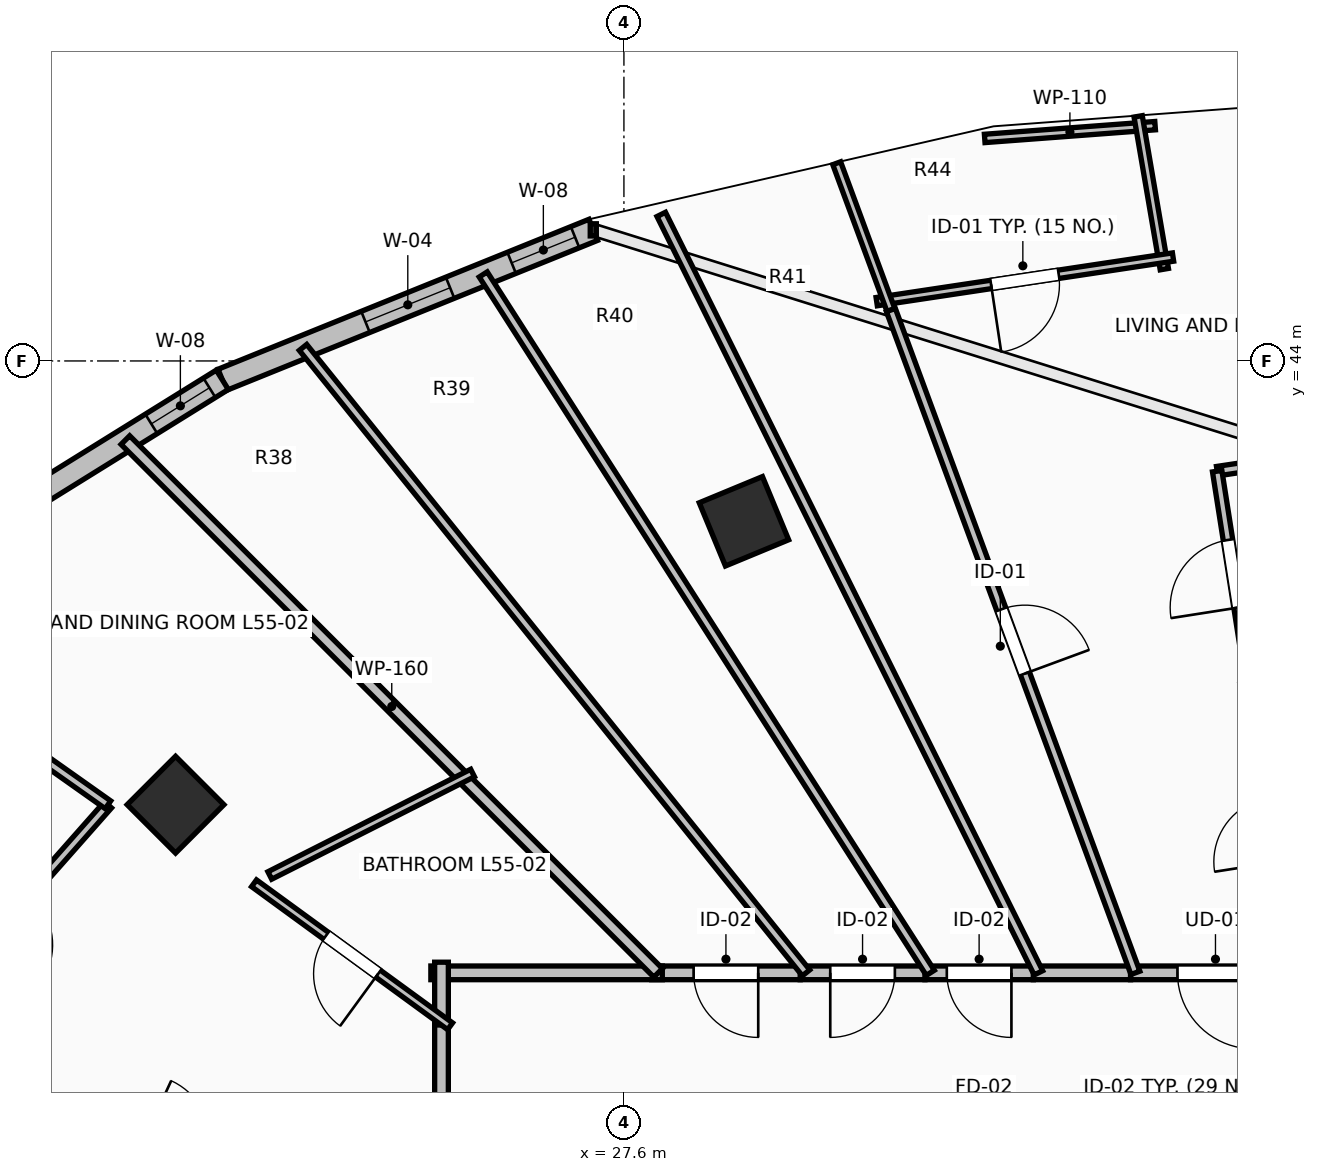
"""IFC4 building model, lengths in metres.
Left out: names, types, materials, properties, quantities, classifications, styles, units other than length and angle.
Written with IfcOpenShell. Run it as: python <this file> out.ifc"""

import sys

from ifc_helpers import new_model, si_unit, direction, frame, frame_2d, origin, origin_2d, place, context, subcontext, project, spatial, rectangle, extrude, element, fill, save


model = new_model("IFC4")
c1 = context("Model", 3, precision=1e-05, world=origin(), true_north=direction((0.0, 1.0)))
c2 = subcontext(c1, "Body", "Model", "MODEL_VIEW")
j1 = project(units=[si_unit("LENGTHUNIT", "METRE"), si_unit("PLANEANGLEUNIT", "RADIAN")], contexts=[c1])
p1 = place(None, origin())
s1 = spatial("IfcSite", under=j1, at=p1, CompositionType="ELEMENT")
p2 = place(p1, origin())
s2 = spatial("IfcBuilding", under=s1, at=p2, CompositionType="ELEMENT")
p3 = place(p2, frame((0.0, 0.0, 203.65)))
s3 = spatial("IfcBuildingStorey", under=s2, at=p3, CompositionType="ELEMENT", Elevation=203.65)
for number, where, z_axis, x_axis in (
    (1, (29.179, 41.891, 0.0), (0.0, 0.0, 1.0), (-0.383, 0.924, 0.0)),
    (2, (21.701, 38.162, 0.0), (0.0, 0.0, 1.0), (-0.707, 0.707, 0.0)),
):
    element("IfcColumn", number, at=place(p3, frame(where, z_axis=z_axis, x_axis=x_axis)), inside=s3, PredefinedType="COLUMN", context=c2, shape_type="SweptSolid", body=[
        extrude(rectangle(XDim=0.9, YDim=0.9, at=origin_2d()), origin(), (0.0, 0.0, 1.0), 3.55),
    ])
p4 = place(p3, frame((27.197, 45.725, 0.0), z_axis=(0.0, 0.0, 1.0), x_axis=(-0.927111094334, -0.374786630981, 0.0)))
e3 = element("IfcWall", 3, at=p4, inside=s3, PredefinedType="STANDARD", context=c2, shape_type="SweptSolid", body=[
    extrude(rectangle(XDim=5.264, YDim=0.3, at=frame_2d((2.632, 0.0))), origin(), (0.0, 0.0, 1.0), 3.29),
])
p5 = place(p4, frame((0.258, 0.0, 0.85)))
e4 = element("IfcOpeningElement", 4, at=p5, cuts=e3, PredefinedType="OPENING", context=c2, shape_type="SweptSolid", body=[
    extrude(rectangle(XDim=0.9, YDim=1.8, at=frame_2d((0.45, 0.9))), frame((0.0, 0.165, 0.0), z_axis=(0.0, -1.0, 0.0), x_axis=(1.0, 0.0, 0.0)), (0.0, 0.0, 1.0), 0.33),
])
p6 = place(p4, frame((2.032, 0.0, 0.85)))
e5 = element("IfcOpeningElement", 5, at=p6, cuts=e3, PredefinedType="OPENING", context=c2, shape_type="SweptSolid", body=[
    extrude(rectangle(XDim=1.2, YDim=1.95, at=frame_2d((0.6, 0.975))), frame((0.0, 0.165, 0.0), z_axis=(0.0, -1.0, 0.0), x_axis=(1.0, 0.0, 0.0)), (0.0, 0.0, 1.0), 0.33),
])
p7 = place(p3, frame((22.316, 43.752, 0.0), z_axis=(0.0, 0.0, 1.0), x_axis=(-0.849647657754, -0.527350791858, 0.0)))
e6 = element("IfcWall", 6, at=p7, inside=s3, PredefinedType="STANDARD", context=c2, shape_type="SweptSolid", body=[
    extrude(rectangle(XDim=5.035, YDim=0.3, at=frame_2d((2.518, 0.0))), origin(), (0.0, 0.0, 1.0), 3.29),
])
p8 = place(p7, frame((0.199, 0.0, 0.85)))
e7 = element("IfcOpeningElement", 7, at=p8, cuts=e6, PredefinedType="OPENING", context=c2, shape_type="SweptSolid", body=[
    extrude(rectangle(XDim=0.9, YDim=1.8, at=frame_2d((0.45, 0.9))), frame((0.0, 0.165, 0.0), z_axis=(0.0, -1.0, 0.0), x_axis=(1.0, 0.0, 0.0)), (0.0, 0.0, 1.0), 0.33),
])
p9 = place(p3, frame((36.5, 35.95, 0.0), z_axis=(0.0, 0.0, 1.0), x_axis=(-1.0, 0.0, 0.0)))
e8 = element("IfcWall", 8, at=p9, inside=s3, PredefinedType="PARTITIONING", context=c2, shape_type="SweptSolid", body=[
    extrude(rectangle(XDim=2.235, YDim=0.18, at=frame_2d((1.118, 0.0))), origin(), (0.0, 0.0, 1.0), 3.29),
])
p10 = place(p9, frame((0.617, 0.0, 0.0)))
e9 = element("IfcOpeningElement", 9, at=p10, cuts=e8, PredefinedType="OPENING", context=c2, shape_type="SweptSolid", body=[
    extrude(rectangle(XDim=1.0, YDim=2.15, at=frame_2d((0.5, 1.075))), frame((0.0, 0.105, 0.0), z_axis=(0.0, -1.0, 0.0), x_axis=(1.0, 0.0, 0.0)), (0.0, 0.0, 1.0), 0.21),
])
p11 = place(p3, frame((34.265, 35.95, 0.0), z_axis=(0.0, 0.0, 1.0), x_axis=(-1.0, 0.0, 0.0)))
e10 = element("IfcWall", 10, at=p11, inside=s3, PredefinedType="PARTITIONING", context=c2, shape_type="SweptSolid", body=[
    extrude(rectangle(XDim=1.279, YDim=0.18, at=frame_2d((0.639, 0.0))), origin(), (0.0, 0.0, 1.0), 3.29),
])
p12 = place(p3, frame((32.986, 35.95, 0.0), z_axis=(0.0, 0.0, 1.0), x_axis=(-1.0, 0.0, 0.0)))
e11 = element("IfcWall", 11, at=p12, inside=s3, PredefinedType="PARTITIONING", context=c2, shape_type="SweptSolid", body=[
    extrude(rectangle(XDim=1.426, YDim=0.18, at=frame_2d((0.713, 0.0))), origin(), (0.0, 0.0, 1.0), 3.29),
])
p13 = place(p12, frame((0.288, 0.0, 0.0)))
e12 = element("IfcOpeningElement", 12, at=p13, cuts=e11, PredefinedType="OPENING", context=c2, shape_type="SweptSolid", body=[
    extrude(rectangle(XDim=0.85, YDim=2.1, at=frame_2d((0.425, 1.05))), frame((0.0, 0.105, 0.0), z_axis=(0.0, -1.0, 0.0), x_axis=(1.0, 0.0, 0.0)), (0.0, 0.0, 1.0), 0.21),
])
p14 = place(p3, frame((31.56, 35.95, 0.0), z_axis=(0.0, 0.0, 1.0), x_axis=(-1.0, 0.0, 0.0)))
e13 = element("IfcWall", 13, at=p14, inside=s3, PredefinedType="PARTITIONING", context=c2, shape_type="SweptSolid", body=[
    extrude(rectangle(XDim=1.641, YDim=0.18, at=frame_2d((0.821, 0.0))), origin(), (0.0, 0.0, 1.0), 2.482),
])
p15 = place(p14, frame((0.396, 0.0, 0.0)))
e14 = element("IfcOpeningElement", 14, at=p15, cuts=e13, PredefinedType="OPENING", context=c2, shape_type="SweptSolid", body=[
    extrude(rectangle(XDim=0.85, YDim=2.1, at=frame_2d((0.425, 1.05))), frame((0.0, 0.105, 0.0), z_axis=(0.0, -1.0, 0.0), x_axis=(1.0, 0.0, 0.0)), (0.0, 0.0, 1.0), 0.21),
])
p16 = place(p3, frame((29.919, 35.95, 0.0), z_axis=(0.0, 0.0, 1.0), x_axis=(-1.0, 0.0, 0.0)))
e15 = element("IfcWall", 15, at=p16, inside=s3, PredefinedType="PARTITIONING", context=c2, shape_type="SweptSolid", body=[
    extrude(rectangle(XDim=1.954, YDim=0.18, at=frame_2d((0.977, 0.0))), origin(), (0.0, 0.0, 1.0), 2.482),
])
p17 = place(p16, frame((0.552, 0.0, 0.0)))
e16 = element("IfcOpeningElement", 16, at=p17, cuts=e15, PredefinedType="OPENING", context=c2, shape_type="SweptSolid", body=[
    extrude(rectangle(XDim=0.85, YDim=2.1, at=frame_2d((0.425, 1.05))), frame((0.0, 0.105, 0.0), z_axis=(0.0, -1.0, 0.0), x_axis=(1.0, 0.0, 0.0)), (0.0, 0.0, 1.0), 0.21),
])
p18 = place(p3, frame((25.2, 35.404, 0.0), z_axis=(0.0, 0.0, 1.0), x_axis=(0.0, -1.0, 0.0)))
e17 = element("IfcWall", 17, at=p18, inside=s3, PredefinedType="PARTITIONING", context=c2, shape_type="SweptSolid", body=[
    extrude(rectangle(XDim=3.563, YDim=0.18, at=frame_2d((1.781, 0.0))), origin(), (0.0, 0.0, 1.0), 2.482),
])
p19 = place(p18, frame((1.281, 0.0, 0.0)))
e18 = element("IfcOpeningElement", 18, at=p19, cuts=e17, PredefinedType="OPENING", context=c2, shape_type="SweptSolid", body=[
    extrude(rectangle(XDim=1.0, YDim=2.15, at=frame_2d((0.5, 1.075))), frame((0.0, 0.105, 0.0), z_axis=(0.0, -1.0, 0.0), x_axis=(1.0, 0.0, 0.0)), (0.0, 0.0, 1.0), 0.21),
])
p20 = place(p3, frame((28.105, 35.95, 0.0), z_axis=(0.0, 0.0, 1.0), x_axis=(-1.0, 0.0, 0.0)))
e19 = element("IfcWall", 19, at=p20, inside=s3, PredefinedType="PARTITIONING", context=c2, shape_type="SweptSolid", body=[
    extrude(rectangle(XDim=3.045, YDim=0.18, at=frame_2d((1.522, 0.0))), origin(), (0.0, 0.0, 1.0), 2.482),
])
p21 = place(p3, frame((25.2, 36.09, 0.0), z_axis=(0.0, 0.0, 1.0), x_axis=(0.0, -1.0, 0.0)))
e20 = element("IfcWall", 20, at=p21, inside=s3, PredefinedType="PARTITIONING", context=c2, shape_type="SweptSolid", body=[
    extrude(rectangle(XDim=0.826, YDim=0.18, at=frame_2d((0.413, 0.0))), origin(), (0.0, 0.0, 1.0), 2.482),
])
p22 = place(p3, frame((34.589, 47.095, 0.0), z_axis=(0.0, 0.0, 1.0), x_axis=(-0.997205784552, -0.074703569226, 0.0)))
e21 = element("IfcWall", 21, at=p22, inside=s3, PredefinedType="PARTITIONING", context=c2, shape_type="SweptSolid", body=[
    extrude(rectangle(XDim=2.249, YDim=0.11, at=frame_2d((1.124, 0.0))), origin(), (0.0, 0.0, 1.0), 3.29),
])
p23 = place(p3, frame((34.365, 47.218, 0.0), z_axis=(0.0, 0.0, 1.0), x_axis=(0.168804313657, -0.985649584635, 0.0)))
e22 = element("IfcWall", 22, at=p23, inside=s3, PredefinedType="PARTITIONING", context=c2, shape_type="SweptSolid", body=[
    extrude(rectangle(XDim=2.039, YDim=0.11, at=frame_2d((1.02, 0.0))), origin(), (0.0, 0.0, 1.0), 3.29),
])
p24 = place(p3, frame((34.824, 45.367, 0.0), z_axis=(0.0, 0.0, 1.0), x_axis=(-0.988877230123, -0.148734070555, 0.0)))
e23 = element("IfcWall", 23, at=p24, inside=s3, PredefinedType="PARTITIONING", context=c2, shape_type="SweptSolid", body=[
    extrude(rectangle(XDim=3.943, YDim=0.11, at=frame_2d((1.971, 0.0))), origin(), (0.0, 0.0, 1.0), 3.29),
])
p25 = place(p24, frame((1.521, 0.0, 0.0)))
e24 = element("IfcOpeningElement", 24, at=p25, cuts=e23, PredefinedType="OPENING", context=c2, shape_type="SweptSolid", body=[
    extrude(rectangle(XDim=0.9, YDim=2.1, at=frame_2d((0.45, 1.05))), frame((0.0, 0.07, 0.0), z_axis=(0.0, -1.0, 0.0), x_axis=(1.0, 0.0, 0.0)), (0.0, 0.0, 1.0), 0.14),
])
p26 = place(p3, frame((31.113, 44.67, 0.0), z_axis=(0.0, 0.0, 1.0), x_axis=(-0.346337161188, 0.938110105894, 0.0)))
e25 = element("IfcWall", 25, at=p26, inside=s3, PredefinedType="PARTITIONING", context=c2, shape_type="SweptSolid", body=[
    extrude(rectangle(XDim=2.059, YDim=0.11, at=frame_2d((1.03, 0.0))), origin(), (0.0, 0.0, 1.0), 3.29),
])
p27 = place(p3, frame((35.405, 42.55, 0.0), z_axis=(0.0, 0.0, 1.0), x_axis=(0.988900154693, 0.148581573718, 0.0)))
e26 = element("IfcWall", 26, at=p27, inside=s3, PredefinedType="PARTITIONING", context=c2, shape_type="SweptSolid", body=[
    extrude(rectangle(XDim=2.624, YDim=0.125, at=frame_2d((1.312, 0.0))), origin(), (0.0, 0.0, 1.0), 2.482),
])
p28 = place(p3, frame((35.828, 39.851, 0.0), z_axis=(0.0, 0.0, 1.0), x_axis=(-0.154971189464, 0.987918989814, 0.0)))
e27 = element("IfcWall", 27, at=p28, inside=s3, PredefinedType="PARTITIONING", context=c2, shape_type="SweptSolid", body=[
    extrude(rectangle(XDim=2.732, YDim=0.125, at=frame_2d((1.366, 0.0))), origin(), (0.0, 0.0, 1.0), 2.482),
])
p29 = place(p28, frame((0.916, 0.0, 0.0)))
e28 = element("IfcOpeningElement", 28, at=p29, cuts=e27, PredefinedType="OPENING", context=c2, shape_type="SweptSolid", body=[
    extrude(rectangle(XDim=0.9, YDim=2.1, at=frame_2d((0.45, 1.05))), frame((0.0, 0.077, 0.0), z_axis=(0.0, -1.0, 0.0), x_axis=(1.0, 0.0, 0.0)), (0.0, 0.0, 1.0), 0.155),
])
p30 = place(p3, frame((31.112, 44.67, 0.0), z_axis=(0.0, 0.0, 1.0), x_axis=(0.346109472243, -0.938194134081, 0.0)))
e29 = element("IfcWall", 29, at=p30, inside=s3, PredefinedType="PARTITIONING", context=c2, shape_type="SweptSolid", body=[
    extrude(rectangle(XDim=9.294, YDim=0.125, at=frame_2d((4.647, 0.0))), origin(), (0.0, 0.0, 1.0), 2.482),
])
p31 = place(p30, frame((4.197, 0.0, 0.0)))
e30 = element("IfcOpeningElement", 30, at=p31, cuts=e29, PredefinedType="OPENING", context=c2, shape_type="SweptSolid", body=[
    extrude(rectangle(XDim=0.9, YDim=2.1, at=frame_2d((0.45, 1.05))), frame((0.0, 0.077, 0.0), z_axis=(0.0, -1.0, 0.0), x_axis=(1.0, 0.0, 0.0)), (0.0, 0.0, 1.0), 0.155),
])
p32 = place(p3, frame((28.091, 45.928, 0.0), z_axis=(0.0, 0.0, 1.0), x_axis=(0.445267068418, -0.895397809793, 0.0)))
e31 = element("IfcWall", 31, at=p32, inside=s3, PredefinedType="PARTITIONING", context=c2, shape_type="SweptSolid", body=[
    extrude(rectangle(XDim=11.144, YDim=0.125, at=frame_2d((5.572, 0.0))), origin(), (0.0, 0.0, 1.0), 2.482),
])
p33 = place(p3, frame((25.749, 45.138, 0.0), z_axis=(0.0, 0.0, 1.0), x_axis=(0.539168632786, -0.842197830335, 0.0)))
e32 = element("IfcWall", 32, at=p33, inside=s3, PredefinedType="PARTITIONING", context=c2, shape_type="SweptSolid", body=[
    extrude(rectangle(XDim=10.909, YDim=0.125, at=frame_2d((5.455, 0.0))), origin(), (0.0, 0.0, 1.0), 2.482),
])
p34 = place(p3, frame((23.378, 44.178, 0.0), z_axis=(0.0, 0.0, 1.0), x_axis=(0.626756813732, -0.779214923137, 0.0)))
e33 = element("IfcWall", 33, at=p34, inside=s3, PredefinedType="PARTITIONING", context=c2, shape_type="SweptSolid", body=[
    extrude(rectangle(XDim=10.559, YDim=0.125, at=frame_2d((5.28, 0.0))), origin(), (0.0, 0.0, 1.0), 2.482),
])
p35 = place(p3, frame((21.041, 42.959, 0.0), z_axis=(0.0, 0.0, 1.0), x_axis=(0.707106781187, -0.707106781187, 0.0)))
e34 = element("IfcWall", 34, at=p35, inside=s3, PredefinedType="PARTITIONING", context=c2, shape_type="SweptSolid", body=[
    extrude(rectangle(XDim=9.912, YDim=0.16, at=frame_2d((4.956, 0.0))), origin(), (0.0, 0.0, 1.0), 2.482),
])
p36 = place(p3, frame((25.313, 35.248, 0.0), z_axis=(0.0, 0.0, 1.0), x_axis=(-0.807968083988, 0.58922625133, 0.0)))
e35 = element("IfcWall", 35, at=p36, inside=s3, PredefinedType="PARTITIONING", context=c2, shape_type="SweptSolid", body=[
    extrude(rectangle(XDim=3.192, YDim=0.11, at=frame_2d((1.596, 0.0))), origin(), (0.0, 0.0, 1.0), 2.482),
])
p37 = place(p36, frame((1.171, 0.0, 0.0)))
e36 = element("IfcOpeningElement", 36, at=p37, cuts=e35, PredefinedType="OPENING", context=c2, shape_type="SweptSolid", body=[
    extrude(rectangle(XDim=0.85, YDim=2.1, at=frame_2d((0.425, 1.05))), frame((0.0, 0.07, 0.0), z_axis=(0.0, -1.0, 0.0), x_axis=(1.0, 0.0, 0.0)), (0.0, 0.0, 1.0), 0.14),
])
p38 = place(p3, frame((22.941, 37.231, 0.0), z_axis=(0.0, 0.0, 1.0), x_axis=(0.892507731149, 0.451032094024, 0.0)))
e37 = element("IfcWall", 37, at=p38, inside=s3, PredefinedType="PARTITIONING", context=c2, shape_type="SweptSolid", body=[
    extrude(rectangle(XDim=2.989, YDim=0.11, at=frame_2d((1.495, 0.0))), origin(), (0.0, 0.0, 1.0), 2.482),
])
p39 = place(p3, frame((20.812, 38.161, 0.0), z_axis=(0.0, 0.0, 1.0), x_axis=(-0.662063683649, -0.749447582418, 0.0)))
e38 = element("IfcWall", 38, at=p39, inside=s3, PredefinedType="PARTITIONING", context=c2, shape_type="SweptSolid", body=[
    extrude(rectangle(XDim=4.018, YDim=0.125, at=frame_2d((2.009, 0.0))), origin(), (0.0, 0.0, 1.0), 3.29),
])
p40 = place(p39, frame((1.559, 0.0, 0.0)))
e39 = element("IfcOpeningElement", 39, at=p40, cuts=e38, PredefinedType="OPENING", context=c2, shape_type="SweptSolid", body=[
    extrude(rectangle(XDim=0.9, YDim=2.1, at=frame_2d((0.45, 1.05))), frame((0.0, 0.077, 0.0), z_axis=(0.0, -1.0, 0.0), x_axis=(1.0, 0.0, 0.0)), (0.0, 0.0, 1.0), 0.155),
])
p41 = place(p3, frame((19.117, 39.36, 0.0), z_axis=(0.0, 0.0, 1.0), x_axis=(0.816315567802, -0.577606175316, 0.0)))
e40 = element("IfcWall", 40, at=p41, inside=s3, PredefinedType="PARTITIONING", context=c2, shape_type="SweptSolid", body=[
    extrude(rectangle(XDim=2.076, YDim=0.125, at=frame_2d((1.038, 0.0))), origin(), (0.0, 0.0, 1.0), 3.29),
])
p42 = place(p3, frame((18.152, 35.15, 0.0), z_axis=(0.0, 0.0, 1.0), x_axis=(0.908152637685, -0.418639208227, 0.0)))
e41 = element("IfcWall", 41, at=p42, inside=s3, PredefinedType="PARTITIONING", context=c2, shape_type="SweptSolid", body=[
    extrude(rectangle(XDim=7.761, YDim=0.125, at=frame_2d((3.88, 0.0))), origin(), (0.0, 0.0, 1.0), 2.824),
])
p43 = place(p42, frame((3.43, 0.0, 0.0)))
e42 = element("IfcOpeningElement", 42, at=p43, cuts=e41, PredefinedType="OPENING", context=c2, shape_type="SweptSolid", body=[
    extrude(rectangle(XDim=0.9, YDim=2.1, at=frame_2d((0.45, 1.05))), frame((0.0, 0.077, 0.0), z_axis=(0.0, -1.0, 0.0), x_axis=(1.0, 0.0, 0.0)), (0.0, 0.0, 1.0), 0.155),
])
p44 = place(p3, frame((12.609, 35.141, 0.0), z_axis=(0.0, 0.0, 1.0), x_axis=(0.940877411069, -0.338747246985, 0.0)))
e43 = element("IfcWall", 43, at=p44, inside=s3, PredefinedType="PARTITIONING", context=c2, shape_type="SweptSolid", body=[
    extrude(rectangle(XDim=13.382, YDim=0.125, at=frame_2d((6.691, 0.0))), origin(), (0.0, 0.0, 1.0), 2.824),
])
p45 = place(p44, frame((6.266, 0.0, 0.0)))
e44 = element("IfcOpeningElement", 44, at=p45, cuts=e43, PredefinedType="OPENING", context=c2, shape_type="SweptSolid", body=[
    extrude(rectangle(XDim=0.85, YDim=2.1, at=frame_2d((0.425, 1.05))), frame((0.0, 0.077, 0.0), z_axis=(0.0, -1.0, 0.0), x_axis=(1.0, 0.0, 0.0)), (0.0, 0.0, 1.0), 0.155),
])
p46 = place(p5, origin())
e45 = element("IfcWindow", 45, at=p46, inside=s3, PartitioningType="SINGLE_PANEL", PredefinedType="WINDOW", context=c2, shape_type="SweptSolid", body=[
    extrude(rectangle(XDim=0.9, YDim=1.8, at=frame_2d((0.45, 0.9))), frame((0.0, 0.03, 0.0), z_axis=(0.0, -1.0, 0.0), x_axis=(1.0, 0.0, 0.0)), (0.0, 0.0, 1.0), 0.06),
])
fill(e4, e45)
p47 = place(p6, origin())
e46 = element("IfcWindow", 46, at=p47, inside=s3, PartitioningType="SINGLE_PANEL", PredefinedType="WINDOW", context=c2, shape_type="SweptSolid", body=[
    extrude(rectangle(XDim=1.2, YDim=1.95, at=frame_2d((0.6, 0.975))), frame((0.0, 0.03, 0.0), z_axis=(0.0, -1.0, 0.0), x_axis=(1.0, 0.0, 0.0)), (0.0, 0.0, 1.0), 0.06),
])
fill(e5, e46)
p48 = place(p8, origin())
e47 = element("IfcWindow", 47, at=p48, inside=s3, PartitioningType="SINGLE_PANEL", PredefinedType="WINDOW", context=c2, shape_type="SweptSolid", body=[
    extrude(rectangle(XDim=0.9, YDim=1.8, at=frame_2d((0.45, 0.9))), frame((0.0, 0.03, 0.0), z_axis=(0.0, -1.0, 0.0), x_axis=(1.0, 0.0, 0.0)), (0.0, 0.0, 1.0), 0.06),
])
fill(e7, e47)
p49 = place(p10, origin())
e48 = element("IfcDoor", 48, at=p49, inside=s3, OperationType="SINGLE_SWING_LEFT", PredefinedType="DOOR", context=c2, shape_type="SweptSolid", body=[
    extrude(rectangle(XDim=1.0, YDim=2.15, at=frame_2d((0.5, 1.075))), frame((0.0, 0.025, 0.0), z_axis=(0.0, -1.0, 0.0), x_axis=(1.0, 0.0, 0.0)), (0.0, 0.0, 1.0), 0.05),
])
fill(e9, e48)
p50 = place(p25, origin())
e49 = element("IfcDoor", 49, at=p50, inside=s3, OperationType="SINGLE_SWING_RIGHT", PredefinedType="DOOR", context=c2, shape_type="SweptSolid", body=[
    extrude(rectangle(XDim=0.9, YDim=2.1, at=frame_2d((0.45, 1.05))), frame((0.0, 0.025, 0.0), z_axis=(0.0, -1.0, 0.0), x_axis=(1.0, 0.0, 0.0)), (0.0, 0.0, 1.0), 0.05),
])
fill(e24, e49)
p51 = place(p29, origin())
e50 = element("IfcDoor", 50, at=p51, inside=s3, OperationType="SINGLE_SWING_LEFT", PredefinedType="DOOR", context=c2, shape_type="SweptSolid", body=[
    extrude(rectangle(XDim=0.9, YDim=2.1, at=frame_2d((0.45, 1.05))), frame((0.0, 0.025, 0.0), z_axis=(0.0, -1.0, 0.0), x_axis=(1.0, 0.0, 0.0)), (0.0, 0.0, 1.0), 0.05),
])
fill(e28, e50)
p52 = place(p31, origin())
e51 = element("IfcDoor", 51, at=p52, inside=s3, OperationType="SINGLE_SWING_RIGHT", PredefinedType="DOOR", context=c2, shape_type="SweptSolid", body=[
    extrude(rectangle(XDim=0.9, YDim=2.1, at=frame_2d((0.45, 1.05))), frame((0.0, 0.025, 0.0), z_axis=(0.0, -1.0, 0.0), x_axis=(1.0, 0.0, 0.0)), (0.0, 0.0, 1.0), 0.05),
])
fill(e30, e51)
p53 = place(p37, origin())
e52 = element("IfcDoor", 52, at=p53, inside=s3, OperationType="SINGLE_SWING_LEFT", PredefinedType="DOOR", context=c2, shape_type="SweptSolid", body=[
    extrude(rectangle(XDim=0.85, YDim=2.1, at=frame_2d((0.425, 1.05))), frame((0.0, 0.025, 0.0), z_axis=(0.0, -1.0, 0.0), x_axis=(1.0, 0.0, 0.0)), (0.0, 0.0, 1.0), 0.05),
])
fill(e36, e52)
p54 = place(p13, origin())
e53 = element("IfcDoor", 53, at=p54, inside=s3, OperationType="SINGLE_SWING_LEFT", PredefinedType="DOOR", context=c2, shape_type="SweptSolid", body=[
    extrude(rectangle(XDim=0.85, YDim=2.1, at=frame_2d((0.425, 1.05))), frame((0.0, 0.025, 0.0), z_axis=(0.0, -1.0, 0.0), x_axis=(1.0, 0.0, 0.0)), (0.0, 0.0, 1.0), 0.05),
])
fill(e12, e53)
p55 = place(p15, origin())
e54 = element("IfcDoor", 54, at=p55, inside=s3, OperationType="SINGLE_SWING_RIGHT", PredefinedType="DOOR", context=c2, shape_type="SweptSolid", body=[
    extrude(rectangle(XDim=0.85, YDim=2.1, at=frame_2d((0.425, 1.05))), frame((0.0, 0.025, 0.0), z_axis=(0.0, -1.0, 0.0), x_axis=(1.0, 0.0, 0.0)), (0.0, 0.0, 1.0), 0.05),
])
fill(e14, e54)
p56 = place(p17, origin())
e55 = element("IfcDoor", 55, at=p56, inside=s3, OperationType="SINGLE_SWING_LEFT", PredefinedType="DOOR", context=c2, shape_type="SweptSolid", body=[
    extrude(rectangle(XDim=0.85, YDim=2.1, at=frame_2d((0.425, 1.05))), frame((0.0, 0.025, 0.0), z_axis=(0.0, -1.0, 0.0), x_axis=(1.0, 0.0, 0.0)), (0.0, 0.0, 1.0), 0.05),
])
fill(e16, e55)
save(model, sys.argv[1])
